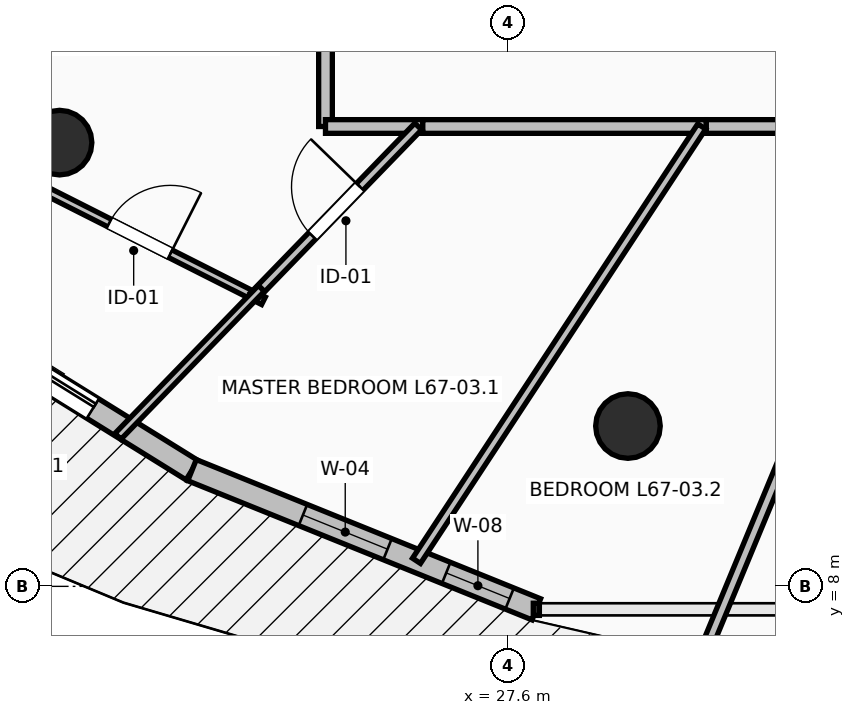
"""IFC4 building model, lengths in metres.
Left out: names, types, materials, properties, quantities, classifications, styles, units other than length and angle.
Written with IfcOpenShell. Run it as: python <this file> out.ifc"""

import sys

from ifc_helpers import new_model, si_unit, direction, frame, frame_2d, origin, origin_2d, place, context, subcontext, project, spatial, rectangle, circle, extrude, element, fill, save


model = new_model("IFC4")
c1 = context("Model", 3, precision=1e-05, world=origin(), true_north=direction((0.0, 1.0)))
c2 = subcontext(c1, "Body", "Model", "MODEL_VIEW")
j1 = project(units=[si_unit("LENGTHUNIT", "METRE"), si_unit("PLANEANGLEUNIT", "RADIAN")], contexts=[c1])
p1 = place(None, origin())
s1 = spatial("IfcSite", under=j1, at=p1, CompositionType="ELEMENT")
p2 = place(p1, origin())
s2 = spatial("IfcBuilding", under=s1, at=p2, CompositionType="ELEMENT")
p3 = place(p2, frame((0.0, 0.0, 248.45)))
s3 = spatial("IfcBuildingStorey", under=s2, at=p3, CompositionType="ELEMENT", Elevation=248.45)
for number, where, z_axis, x_axis in (
    (1, (21.701, 13.838, 0.0), (0.0, 0.0, 1.0), (-0.707, -0.707, 0.0)),
    (2, (29.179, 10.109, 0.0), (0.0, 0.0, 1.0), (-0.383, -0.924, 0.0)),
):
    element("IfcColumn", number, at=place(p3, frame(where, z_axis=z_axis, x_axis=x_axis)), inside=s3, PredefinedType="COLUMN", context=c2, shape_type="SweptSolid", body=[
        extrude(circle(Radius=0.425, at=origin_2d()), origin(), (0.0, 0.0, 1.0), 3.55),
    ])
p4 = place(p3, frame((19.474, 11.992, 0.0), z_axis=(0.0, 0.0, 1.0), x_axis=(0.849702323036, -0.527262707032, 0.0)))
e3 = element("IfcWall", 3, at=p4, inside=s3, PredefinedType="STANDARD", context=c2, shape_type="SweptSolid", body=[
    extrude(rectangle(XDim=4.672, YDim=0.3, at=frame_2d((2.336, 0.0))), origin(), (0.0, 0.0, 1.0), 3.29),
])
p5 = place(p4, frame((1.536, 0.0, 0.0)))
e4 = element("IfcOpeningElement", 4, at=p5, cuts=e3, PredefinedType="OPENING", context=c2, shape_type="SweptSolid", body=[
    extrude(rectangle(XDim=1.6, YDim=2.3, at=frame_2d((0.8, 1.15))), frame((0.0, 0.165, 0.0), z_axis=(0.0, -1.0, 0.0), x_axis=(1.0, 0.0, 0.0)), (0.0, 0.0, 1.0), 0.33),
])
p6 = place(p3, frame((23.444, 9.529, 0.0), z_axis=(0.0, 0.0, 1.0), x_axis=(0.927147375511, -0.374696869594, 0.0)))
e5 = element("IfcWall", 5, at=p6, inside=s3, PredefinedType="STANDARD", context=c2, shape_type="SweptSolid", body=[
    extrude(rectangle(XDim=4.885, YDim=0.3, at=frame_2d((2.443, 0.0))), origin(), (0.0, 0.0, 1.0), 3.29),
])
p7 = place(p6, frame((1.574, 0.0, 0.85)))
e6 = element("IfcOpeningElement", 6, at=p7, cuts=e5, PredefinedType="OPENING", context=c2, shape_type="SweptSolid", body=[
    extrude(rectangle(XDim=1.2, YDim=1.95, at=frame_2d((0.6, 0.975))), frame((0.0, 0.165, 0.0), z_axis=(0.0, -1.0, 0.0), x_axis=(1.0, 0.0, 0.0)), (0.0, 0.0, 1.0), 0.33),
])
p8 = place(p6, frame((3.606, 0.0, 0.85)))
e7 = element("IfcOpeningElement", 7, at=p8, cuts=e5, PredefinedType="OPENING", context=c2, shape_type="SweptSolid", body=[
    extrude(rectangle(XDim=0.9, YDim=1.8, at=frame_2d((0.45, 0.9))), frame((0.0, 0.165, 0.0), z_axis=(0.0, -1.0, 0.0), x_axis=(1.0, 0.0, 0.0)), (0.0, 0.0, 1.0), 0.33),
])
p9 = place(p3, frame((25.2, 17.812, 0.0), z_axis=(0.0, 0.0, 1.0), x_axis=(0.0, -1.0, 0.0)))
e8 = element("IfcWall", 8, at=p9, inside=s3, PredefinedType="PARTITIONING", context=c2, shape_type="SweptSolid", body=[
    extrude(rectangle(XDim=3.762, YDim=0.18, at=frame_2d((1.881, 0.0))), origin(), (0.0, 0.0, 1.0), 2.482),
])
p10 = place(p9, frame((1.381, 0.0, 0.0)))
e9 = element("IfcOpeningElement", 9, at=p10, cuts=e8, PredefinedType="OPENING", context=c2, shape_type="SweptSolid", body=[
    extrude(rectangle(XDim=1.0, YDim=2.15, at=frame_2d((0.5, 1.075))), frame((0.0, 0.105, 0.0), z_axis=(0.0, -1.0, 0.0), x_axis=(1.0, 0.0, 0.0)), (0.0, 0.0, 1.0), 0.21),
])
p11 = place(p3, frame((25.2, 14.05, 0.0), z_axis=(0.0, 0.0, 1.0), x_axis=(1.0, 0.0, 0.0)))
e10 = element("IfcWall", 10, at=p11, inside=s3, PredefinedType="PARTITIONING", context=c2, shape_type="SweptSolid", body=[
    extrude(rectangle(XDim=1.28, YDim=0.18, at=frame_2d((0.64, 0.0))), origin(), (0.0, 0.0, 1.0), 2.972),
])
p12 = place(p3, frame((26.48, 14.05, 0.0), z_axis=(0.0, 0.0, 1.0), x_axis=(1.0, 0.0, 0.0)))
e11 = element("IfcWall", 11, at=p12, inside=s3, PredefinedType="PARTITIONING", context=c2, shape_type="SweptSolid", body=[
    extrude(rectangle(XDim=3.73, YDim=0.18, at=frame_2d((1.865, 0.0))), origin(), (0.0, 0.0, 1.0), 2.482),
])
p13 = place(p3, frame((30.21, 14.05, 0.0), z_axis=(0.0, 0.0, 1.0), x_axis=(1.0, 0.0, 0.0)))
e12 = element("IfcWall", 12, at=p13, inside=s3, PredefinedType="PARTITIONING", context=c2, shape_type="SweptSolid", body=[
    extrude(rectangle(XDim=2.9, YDim=0.18, at=frame_2d((1.45, 0.0))), origin(), (0.0, 0.0, 1.0), 3.29),
])
p14 = place(p13, frame((1.025, 0.0, 0.0)))
e13 = element("IfcOpeningElement", 13, at=p14, cuts=e12, PredefinedType="OPENING", context=c2, shape_type="SweptSolid", body=[
    extrude(rectangle(XDim=0.85, YDim=2.1, at=frame_2d((0.425, 1.05))), frame((0.0, 0.105, 0.0), z_axis=(0.0, -1.0, 0.0), x_axis=(1.0, 0.0, 0.0)), (0.0, 0.0, 1.0), 0.21),
])
p15 = place(p3, frame((21.131, 13.4, 0.0), z_axis=(0.0, 0.0, 1.0), x_axis=(0.892570631547, -0.450907604394, 0.0)))
e14 = element("IfcWall", 14, at=p15, inside=s3, PredefinedType="PARTITIONING", context=c2, shape_type="SweptSolid", body=[
    extrude(rectangle(XDim=3.645, YDim=0.11, at=frame_2d((1.822, 0.0))), origin(), (0.0, 0.0, 1.0), 3.29),
])
p16 = place(p15, frame((1.372, 0.0, 0.0)))
e15 = element("IfcOpeningElement", 15, at=p16, cuts=e14, PredefinedType="OPENING", context=c2, shape_type="SweptSolid", body=[
    extrude(rectangle(XDim=0.9, YDim=2.1, at=frame_2d((0.45, 1.05))), frame((0.0, 0.07, 0.0), z_axis=(0.0, -1.0, 0.0), x_axis=(1.0, 0.0, 0.0)), (0.0, 0.0, 1.0), 0.14),
])
p17 = place(p3, frame((24.259, 11.82, 0.0), z_axis=(0.0, 0.0, 1.0), x_axis=(0.695894072482, 0.718144442215, 0.0)))
e16 = element("IfcWall", 16, at=p17, inside=s3, PredefinedType="PARTITIONING", context=c2, shape_type="SweptSolid", body=[
    extrude(rectangle(XDim=3.105, YDim=0.125, at=frame_2d((1.553, 0.0))), origin(), (0.0, 0.0, 1.0), 2.874),
])
p18 = place(p17, frame((1.103, 0.0, 0.0)))
e17 = element("IfcOpeningElement", 17, at=p18, cuts=e16, PredefinedType="OPENING", context=c2, shape_type="SweptSolid", body=[
    extrude(rectangle(XDim=0.9, YDim=2.1, at=frame_2d((0.45, 1.05))), frame((0.0, 0.077, 0.0), z_axis=(0.0, -1.0, 0.0), x_axis=(1.0, 0.0, 0.0)), (0.0, 0.0, 1.0), 0.155),
])
p19 = place(p3, frame((22.469, 9.973, 0.0), z_axis=(0.0, 0.0, 1.0), x_axis=(0.695944713466, 0.718095366786, 0.0)))
e18 = element("IfcWall", 18, at=p19, inside=s3, PredefinedType="PARTITIONING", context=c2, shape_type="SweptSolid", body=[
    extrude(rectangle(XDim=2.711, YDim=0.11, at=frame_2d((1.356, 0.0))), origin(), (0.0, 0.0, 1.0), 3.29),
])
p20 = place(p3, frame((26.397, 8.336, 0.0), z_axis=(0.0, 0.0, 1.0), x_axis=(0.548967647923, 0.835843598728, 0.0)))
e19 = element("IfcWall", 19, at=p20, inside=s3, PredefinedType="PARTITIONING", context=c2, shape_type="SweptSolid", body=[
    extrude(rectangle(XDim=6.836, YDim=0.125, at=frame_2d((3.418, 0.0))), origin(), (0.0, 0.0, 1.0), 2.482),
])
p21 = place(p3, frame((30.207, 7.187, 0.0), z_axis=(0.0, 0.0, 1.0), x_axis=(0.382679691634, 0.923881081964, 0.0)))
e20 = element("IfcWall", 20, at=p21, inside=s3, PredefinedType="PARTITIONING", context=c2, shape_type="SweptSolid", body=[
    extrude(rectangle(XDim=7.168, YDim=0.14, at=frame_2d((3.584, 0.0))), origin(), (0.0, 0.0, 1.0), 2.874),
])
p22 = place(p5, origin())
e21 = element("IfcDoor", 21, at=p22, inside=s3, OperationType="SLIDING_TO_LEFT", PredefinedType="DOOR", context=c2, shape_type="SweptSolid", body=[
    extrude(rectangle(XDim=1.6, YDim=2.3, at=frame_2d((0.8, 1.15))), frame((0.0, 0.025, 0.0), z_axis=(0.0, -1.0, 0.0), x_axis=(1.0, 0.0, 0.0)), (0.0, 0.0, 1.0), 0.05),
])
fill(e4, e21)
p23 = place(p7, origin())
e22 = element("IfcWindow", 22, at=p23, inside=s3, PartitioningType="SINGLE_PANEL", PredefinedType="WINDOW", context=c2, shape_type="SweptSolid", body=[
    extrude(rectangle(XDim=1.2, YDim=1.95, at=frame_2d((0.6, 0.975))), frame((0.0, 0.03, 0.0), z_axis=(0.0, -1.0, 0.0), x_axis=(1.0, 0.0, 0.0)), (0.0, 0.0, 1.0), 0.06),
])
fill(e6, e22)
p24 = place(p8, origin())
e23 = element("IfcWindow", 23, at=p24, inside=s3, PartitioningType="SINGLE_PANEL", PredefinedType="WINDOW", context=c2, shape_type="SweptSolid", body=[
    extrude(rectangle(XDim=0.9, YDim=1.8, at=frame_2d((0.45, 0.9))), frame((0.0, 0.03, 0.0), z_axis=(0.0, -1.0, 0.0), x_axis=(1.0, 0.0, 0.0)), (0.0, 0.0, 1.0), 0.06),
])
fill(e7, e23)
p25 = place(p16, origin())
e24 = element("IfcDoor", 24, at=p25, inside=s3, OperationType="SINGLE_SWING_RIGHT", PredefinedType="DOOR", context=c2, shape_type="SweptSolid", body=[
    extrude(rectangle(XDim=0.9, YDim=2.1, at=frame_2d((0.45, 1.05))), frame((0.0, 0.025, 0.0), z_axis=(0.0, -1.0, 0.0), x_axis=(1.0, 0.0, 0.0)), (0.0, 0.0, 1.0), 0.05),
])
fill(e15, e24)
p26 = place(p18, origin())
e25 = element("IfcDoor", 25, at=p26, inside=s3, OperationType="SINGLE_SWING_RIGHT", PredefinedType="DOOR", context=c2, shape_type="SweptSolid", body=[
    extrude(rectangle(XDim=0.9, YDim=2.1, at=frame_2d((0.45, 1.05))), frame((0.0, 0.025, 0.0), z_axis=(0.0, -1.0, 0.0), x_axis=(1.0, 0.0, 0.0)), (0.0, 0.0, 1.0), 0.05),
])
fill(e17, e25)
save(model, sys.argv[1])
